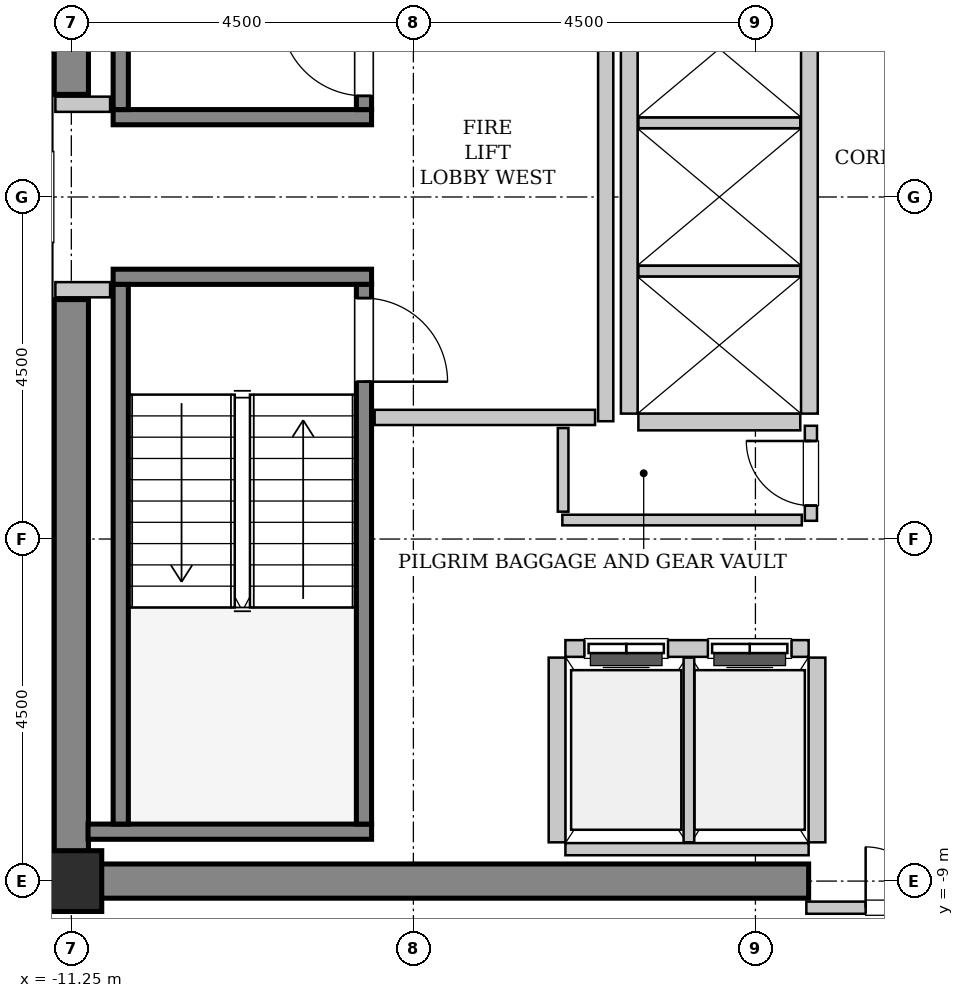
"""IFC4 building model, lengths in metres.
Left out: names, types, materials, properties, quantities, classifications, styles, units other than length and angle.
Written with IfcOpenShell. Run it as: python <this file> out.ifc"""

import sys

from ifc_helpers import new_model, si_unit, direction, frame, frame_2d, origin, origin_2d, place, context, subcontext, project, spatial, rectangle, hollow_rectangle, extrude, source, transform, mapped, element, fill, save


model = new_model("IFC4")
c1 = context("Model", 3, precision=1e-05, world=origin(), true_north=direction((0.0, 1.0)))
c2 = subcontext(c1, "Body", "Model", "MODEL_VIEW")
j1 = project(units=[si_unit("LENGTHUNIT", "METRE"), si_unit("PLANEANGLEUNIT", "RADIAN")], contexts=[c1])
p1 = place(None, origin())
s1 = spatial("IfcSite", under=j1, at=p1, CompositionType="ELEMENT")
p2 = place(p1, origin())
s2 = spatial("IfcBuilding", under=s1, at=p2, CompositionType="ELEMENT")
p3 = place(p2, frame((0.0, 0.0, 256.0)))
s3 = spatial("IfcBuildingStorey", under=s2, at=p3, CompositionType="ELEMENT", Elevation=256.0)
m1 = source(origin(), c2, "Body", "SweptSolid", [
    extrude(rectangle(XDim=9.925, YDim=0.45, at=frame_2d((4.962, 0.0))), origin(), (0.0, 0.0, 1.0), 3.8),
])
p4 = place(p3, frame((-11.475, -9.0, 0.0), z_axis=(0.0, 0.0, 1.0), x_axis=(1.0, 0.0, 0.0)))
e1 = element("IfcWall", 1, at=p4, inside=s3, PredefinedType="SHEAR", context=c2, shape_type="MappedRepresentation", body=[
    mapped(m1, transform((0.0, 0.0, 0.0), x_axis=(1.0, 0.0, 0.0), y_axis=(0.0, 1.0, 0.0), z_axis=(0.0, 0.0, 1.0), scale=1.0)),
])
m2 = source(origin(), c2, "Body", "SweptSolid", [
    extrude(rectangle(XDim=7.425, YDim=0.45, at=frame_2d((3.712, 0.0))), origin(), (0.0, 0.0, 1.0), 3.8),
])
for number, where, z_axis, x_axis in (
    (2, (-11.25, -8.775, 0.0), (0.0, 0.0, 1.0), (0.0, 1.0, 0.0)),
    (3, (-11.25, 1.35, 0.0), (0.0, 0.0, 1.0), (0.0, 1.0, 0.0)),
):
    element("IfcWall", number, at=place(p3, frame(where, z_axis=z_axis, x_axis=x_axis)), inside=s3, PredefinedType="SHEAR", context=c2, shape_type="MappedRepresentation", body=[
        mapped(m2, transform((0.0, 0.0, 0.0), x_axis=(1.0, 0.0, 0.0), y_axis=(0.0, 1.0, 0.0), z_axis=(0.0, 0.0, 1.0), scale=1.0)),
    ])
m3 = source(origin(), c2, "Body", "SweptSolid", [
    extrude(hollow_rectangle(XDim=0.8, YDim=0.8, WallThickness=0.04, InnerFilletRadius=0.04, OuterFilletRadius=0.08, at=origin_2d()), origin(), (0.0, 0.0, 1.0), 3.8),
])
p5 = place(p3, frame((-11.25, -9.0, 0.0), z_axis=(0.0, 0.0, 1.0), x_axis=(1.0, 0.0, 0.0)))
e4 = element("IfcColumn", 4, at=p5, inside=s3, PredefinedType="COLUMN", context=c2, shape_type="MappedRepresentation", body=[
    mapped(m3, transform((0.0, 0.0, 0.0), x_axis=(1.0, 0.0, 0.0), y_axis=(0.0, 1.0, 0.0), z_axis=(0.0, 0.0, 1.0), scale=1.0)),
])
m4 = source(origin(), c2, "Body", "SweptSolid", [
    extrude(rectangle(XDim=3.4, YDim=0.2, at=frame_2d((1.7, 0.0))), origin(), (0.0, 0.0, 1.0), 3.8),
])
p6 = place(p3, frame((-7.3, 1.05, 0.0), z_axis=(0.0, 0.0, 1.0), x_axis=(-1.0, 0.0, 0.0)))
e5 = element("IfcWall", 5, at=p6, inside=s3, PredefinedType="SOLIDWALL", context=c2, shape_type="MappedRepresentation", body=[
    mapped(m4, transform((0.0, 0.0, 0.0), x_axis=(1.0, 0.0, 0.0), y_axis=(0.0, 1.0, 0.0), z_axis=(0.0, 0.0, 1.0), scale=1.0)),
])
m5 = source(origin(), c2, "Body", "SweptSolid", [
    extrude(rectangle(XDim=7.1, YDim=0.2, at=frame_2d((3.55, 0.0))), origin(), (0.0, 0.0, 1.0), 3.8),
])
p7 = place(p3, frame((-7.4, 1.15, 0.0), z_axis=(0.0, 0.0, 1.0), x_axis=(0.0, 1.0, 0.0)))
e6 = element("IfcWall", 6, at=p7, inside=s3, PredefinedType="SOLIDWALL", context=c2, shape_type="MappedRepresentation", body=[
    mapped(m5, transform((0.0, 0.0, 0.0), x_axis=(1.0, 0.0, 0.0), y_axis=(0.0, 1.0, 0.0), z_axis=(0.0, 0.0, 1.0), scale=1.0)),
])
p8 = place(p7, frame((0.18, 0.0, 0.0)))
e7 = element("IfcOpeningElement", 7, at=p8, cuts=e6, PredefinedType="OPENING", context=c2, shape_type="SweptSolid", body=[
    extrude(rectangle(XDim=1.1, YDim=2.15, at=frame_2d((0.55, 1.075))), frame((0.0, 0.11, 0.0), z_axis=(0.0, -1.0, 0.0), x_axis=(1.0, 0.0, 0.0)), (0.0, 0.0, 1.0), 0.22),
])
p9 = place(p3, frame((-10.6, 1.15, 0.0), z_axis=(0.0, 0.0, 1.0), x_axis=(0.0, 1.0, 0.0)))
e8 = element("IfcWall", 8, at=p9, inside=s3, PredefinedType="SOLIDWALL", context=c2, shape_type="MappedRepresentation", body=[
    mapped(m5, transform((0.0, 0.0, 0.0), x_axis=(1.0, 0.0, 0.0), y_axis=(0.0, 1.0, 0.0), z_axis=(0.0, 0.0, 1.0), scale=1.0)),
])
p10 = place(p3, frame((-10.7, -1.05, 0.0), z_axis=(0.0, 0.0, 1.0), x_axis=(1.0, 0.0, 0.0)))
e9 = element("IfcWall", 9, at=p10, inside=s3, PredefinedType="SOLIDWALL", context=c2, shape_type="MappedRepresentation", body=[
    mapped(m4, transform((0.0, 0.0, 0.0), x_axis=(1.0, 0.0, 0.0), y_axis=(0.0, 1.0, 0.0), z_axis=(0.0, 0.0, 1.0), scale=1.0)),
])
m6 = source(origin(), c2, "Body", "SweptSolid", [
    extrude(rectangle(XDim=3.73, YDim=0.2, at=frame_2d((1.865, 0.0))), origin(), (0.0, 0.0, 1.0), 3.8),
])
p11 = place(p3, frame((-11.03, -8.35, 0.0), z_axis=(0.0, 0.0, 1.0), x_axis=(1.0, 0.0, 0.0)))
e10 = element("IfcWall", 10, at=p11, inside=s3, PredefinedType="SOLIDWALL", context=c2, shape_type="MappedRepresentation", body=[
    mapped(m6, transform((0.0, 0.0, 0.0), x_axis=(1.0, 0.0, 0.0), y_axis=(0.0, 1.0, 0.0), z_axis=(0.0, 0.0, 1.0), scale=1.0)),
])
p12 = place(p3, frame((-10.6, -1.15, 0.0), z_axis=(0.0, 0.0, 1.0), x_axis=(0.0, -1.0, 0.0)))
e11 = element("IfcWall", 11, at=p12, inside=s3, PredefinedType="SOLIDWALL", context=c2, shape_type="MappedRepresentation", body=[
    mapped(m5, transform((0.0, 0.0, 0.0), x_axis=(1.0, 0.0, 0.0), y_axis=(0.0, 1.0, 0.0), z_axis=(0.0, 0.0, 1.0), scale=1.0)),
])
p13 = place(p3, frame((-7.4, -1.15, 0.0), z_axis=(0.0, 0.0, 1.0), x_axis=(0.0, -1.0, 0.0)))
e12 = element("IfcWall", 12, at=p13, inside=s3, PredefinedType="SOLIDWALL", context=c2, shape_type="MappedRepresentation", body=[
    mapped(m5, transform((0.0, 0.0, 0.0), x_axis=(1.0, 0.0, 0.0), y_axis=(0.0, 1.0, 0.0), z_axis=(0.0, 0.0, 1.0), scale=1.0)),
])
p14 = place(p13, frame((0.18, 0.0, 0.0)))
e13 = element("IfcOpeningElement", 13, at=p14, cuts=e12, PredefinedType="OPENING", context=c2, shape_type="SweptSolid", body=[
    extrude(rectangle(XDim=1.1, YDim=2.15, at=frame_2d((0.55, 1.075))), frame((0.0, 0.11, 0.0), z_axis=(0.0, -1.0, 0.0), x_axis=(1.0, 0.0, 0.0)), (0.0, 0.0, 1.0), 0.22),
])
m7 = source(origin(), c2, "Body", "SweptSolid", [
    extrude(rectangle(XDim=3.2, YDim=0.22, at=frame_2d((1.6, 0.0))), origin(), (0.0, 0.0, 1.0), 3.485),
])
p15 = place(p3, frame((-1.55, -5.94, 0.0), z_axis=(0.0, 0.0, 1.0), x_axis=(-1.0, 0.0, 0.0)))
e14 = element("IfcWall", 14, at=p15, inside=s3, PredefinedType="SOLIDWALL", context=c2, shape_type="MappedRepresentation", body=[
    mapped(m7, transform((0.0, 0.0, 0.0), x_axis=(1.0, 0.0, 0.0), y_axis=(0.0, 1.0, 0.0), z_axis=(0.0, 0.0, 1.0), scale=1.0)),
])
p16 = place(p15, frame((1.85, 0.0, 0.0)))
e15 = element("IfcOpeningElement", 15, at=p16, cuts=e14, PredefinedType="OPENING", context=c2, shape_type="SweptSolid", body=[
    extrude(rectangle(XDim=1.1, YDim=2.2, at=frame_2d((0.55, 1.1))), frame((0.0, 0.12, 0.0), z_axis=(0.0, -1.0, 0.0), x_axis=(1.0, 0.0, 0.0)), (0.0, 0.0, 1.0), 0.24),
])
p17 = place(p15, frame((0.225, 0.0, 0.0)))
e16 = element("IfcOpeningElement", 16, at=p17, cuts=e14, PredefinedType="OPENING", context=c2, shape_type="SweptSolid", body=[
    extrude(rectangle(XDim=1.1, YDim=2.2, at=frame_2d((0.55, 1.1))), frame((0.0, 0.12, 0.0), z_axis=(0.0, -1.0, 0.0), x_axis=(1.0, 0.0, 0.0)), (0.0, 0.0, 1.0), 0.24),
])
m8 = source(origin(), c2, "Body", "SweptSolid", [
    extrude(rectangle(XDim=3.2, YDim=0.16, at=frame_2d((1.6, 0.0))), origin(), (0.0, 0.0, 1.0), 2.575),
])
p18 = place(p3, frame((-4.75, -8.58, 0.0), z_axis=(0.0, 0.0, 1.0), x_axis=(1.0, 0.0, 0.0)))
e17 = element("IfcWall", 17, at=p18, inside=s3, PredefinedType="PARTITIONING", context=c2, shape_type="MappedRepresentation", body=[
    mapped(m8, transform((0.0, 0.0, 0.0), x_axis=(1.0, 0.0, 0.0), y_axis=(0.0, 1.0, 0.0), z_axis=(0.0, 0.0, 1.0), scale=1.0)),
])
m9 = source(origin(), c2, "Body", "SweptSolid", [
    extrude(rectangle(XDim=2.43, YDim=0.22, at=frame_2d((1.215, 0.0))), origin(), (0.0, 0.0, 1.0), 3.485),
])
p19 = place(p3, frame((-4.86, -6.06, 0.0), z_axis=(0.0, 0.0, 1.0), x_axis=(0.0, -1.0, 0.0)))
e18 = element("IfcWall", 18, at=p19, inside=s3, PredefinedType="SOLIDWALL", context=c2, shape_type="MappedRepresentation", body=[
    mapped(m9, transform((0.0, 0.0, 0.0), x_axis=(1.0, 0.0, 0.0), y_axis=(0.0, 1.0, 0.0), z_axis=(0.0, 0.0, 1.0), scale=1.0)),
])
m10 = source(origin(), c2, "Body", "SweptSolid", [
    extrude(rectangle(XDim=2.43, YDim=0.14, at=frame_2d((1.215, 0.0))), origin(), (0.0, 0.0, 1.0), 3.485),
])
p20 = place(p3, frame((-3.125, -8.49, 0.0), z_axis=(0.0, 0.0, 1.0), x_axis=(0.0, 1.0, 0.0)))
e19 = element("IfcWall", 19, at=p20, inside=s3, PredefinedType="PARTITIONING", context=c2, shape_type="MappedRepresentation", body=[
    mapped(m10, transform((0.0, 0.0, 0.0), x_axis=(1.0, 0.0, 0.0), y_axis=(0.0, 1.0, 0.0), z_axis=(0.0, 0.0, 1.0), scale=1.0)),
])
p21 = place(p3, frame((-1.44, -8.49, 0.0), z_axis=(0.0, 0.0, 1.0), x_axis=(0.0, 1.0, 0.0)))
e20 = element("IfcWall", 20, at=p21, inside=s3, PredefinedType="SOLIDWALL", context=c2, shape_type="MappedRepresentation", body=[
    mapped(m9, transform((0.0, 0.0, 0.0), x_axis=(1.0, 0.0, 0.0), y_axis=(0.0, 1.0, 0.0), z_axis=(0.0, 0.0, 1.0), scale=1.0)),
])
m11 = source(origin(), c2, "Body", "SweptSolid", [
    extrude(rectangle(XDim=5.7, YDim=0.22, at=frame_2d((2.85, 0.0))), origin(), (0.0, 0.0, 1.0), 3.485),
])
for number, where, z_axis, x_axis in (
    (21, (-1.54, -2.85, 0.0), (0.0, 0.0, 1.0), (0.0, 1.0, 0.0)),
    (22, (-3.91, 2.85, 0.0), (0.0, 0.0, 1.0), (0.0, -1.0, 0.0)),
):
    element("IfcWall", number, at=place(p3, frame(where, z_axis=z_axis, x_axis=x_axis)), inside=s3, PredefinedType="SOLIDWALL", context=c2, shape_type="MappedRepresentation", body=[
        mapped(m11, transform((0.0, 0.0, 0.0), x_axis=(1.0, 0.0, 0.0), y_axis=(0.0, 1.0, 0.0), z_axis=(0.0, 0.0, 1.0), scale=1.0)),
    ])
m12 = source(origin(), c2, "Body", "SweptSolid", [
    extrude(rectangle(XDim=2.13, YDim=0.22, at=frame_2d((1.065, 0.0))), origin(), (0.0, 0.0, 1.0), 3.485),
])
p22 = place(p3, frame((-3.79, -2.96, 0.0), z_axis=(0.0, 0.0, 1.0), x_axis=(1.0, 0.0, 0.0)))
e23 = element("IfcWall", 23, at=p22, inside=s3, PredefinedType="SOLIDWALL", context=c2, shape_type="MappedRepresentation", body=[
    mapped(m12, transform((0.0, 0.0, 0.0), x_axis=(1.0, 0.0, 0.0), y_axis=(0.0, 1.0, 0.0), z_axis=(0.0, 0.0, 1.0), scale=1.0)),
])
m13 = source(origin(), c2, "Body", "SweptSolid", [
    extrude(rectangle(XDim=2.13, YDim=0.14, at=frame_2d((1.065, 0.0))), origin(), (0.0, 0.0, 1.0), 3.485),
])
for number, where, z_axis, x_axis in (
    (24, (-3.79, -0.975, 0.0), (0.0, 0.0, 1.0), (1.0, 0.0, 0.0)),
    (25, (-3.79, 0.975, 0.0), (0.0, 0.0, 1.0), (1.0, 0.0, 0.0)),
):
    element("IfcWall", number, at=place(p3, frame(where, z_axis=z_axis, x_axis=x_axis)), inside=s3, PredefinedType="PARTITIONING", context=c2, shape_type="MappedRepresentation", body=[
        mapped(m13, transform((0.0, 0.0, 0.0), x_axis=(1.0, 0.0, 0.0), y_axis=(0.0, 1.0, 0.0), z_axis=(0.0, 0.0, 1.0), scale=1.0)),
    ])
m14 = source(origin(), c2, "Body", "SweptSolid", [
    extrude(rectangle(XDim=5.9, YDim=0.2, at=frame_2d((2.95, 0.0))), origin(), (0.0, 0.0, 1.0), 3.485),
])
p23 = place(p3, frame((-4.22, -2.95, 0.0), z_axis=(0.0, 0.0, 1.0), x_axis=(0.0, 1.0, 0.0)))
e26 = element("IfcWall", 26, at=p23, inside=s3, PredefinedType="PARTITIONING", context=c2, shape_type="MappedRepresentation", body=[
    mapped(m14, transform((0.0, 0.0, 0.0), x_axis=(1.0, 0.0, 0.0), y_axis=(0.0, 1.0, 0.0), z_axis=(0.0, 0.0, 1.0), scale=1.0)),
])
m15 = source(origin(), c2, "Body", "SweptSolid", [
    extrude(rectangle(XDim=2.9, YDim=0.2, at=frame_2d((1.45, 0.0))), origin(), (0.0, 0.0, 1.0), 3.485),
])
p24 = place(p3, frame((-7.26, -2.9, 0.0), z_axis=(0.0, 0.0, 1.0), x_axis=(1.0, 0.0, 0.0)))
e27 = element("IfcWall", 27, at=p24, inside=s3, PredefinedType="PARTITIONING", context=c2, shape_type="MappedRepresentation", body=[
    mapped(m15, transform((0.0, 0.0, 0.0), x_axis=(1.0, 0.0, 0.0), y_axis=(0.0, 1.0, 0.0), z_axis=(0.0, 0.0, 1.0), scale=1.0)),
])
m16 = source(origin(), c2, "Body", "SweptSolid", [
    extrude(rectangle(XDim=0.72, YDim=0.2, at=frame_2d((0.36, 0.0))), origin(), (0.0, 0.0, 1.0), 3.485),
])
for number, where, z_axis, x_axis in (
    (28, (-11.46, 1.22, 0.0), (0.0, 0.0, 1.0), (1.0, 0.0, 0.0)),
    (29, (-11.46, -1.22, 0.0), (0.0, 0.0, 1.0), (1.0, 0.0, 0.0)),
):
    element("IfcWall", number, at=place(p3, frame(where, z_axis=z_axis, x_axis=x_axis)), inside=s3, PredefinedType="PARTITIONING", context=c2, shape_type="MappedRepresentation", body=[
        mapped(m16, transform((0.0, 0.0, 0.0), x_axis=(1.0, 0.0, 0.0), y_axis=(0.0, 1.0, 0.0), z_axis=(0.0, 0.0, 1.0), scale=1.0)),
    ])
m17 = source(origin(), c2, "Body", "SweptSolid", [
    extrude(rectangle(XDim=3.16, YDim=0.16, at=frame_2d((1.58, 0.0))), origin(), (0.0, 0.0, 1.0), 2.575),
])
p25 = place(p3, frame((-1.58, -9.35, 0.0), z_axis=(0.0, 0.0, 1.0), x_axis=(1.0, 0.0, 0.0)))
e30 = element("IfcWall", 30, at=p25, inside=s3, PredefinedType="PARTITIONING", context=c2, shape_type="MappedRepresentation", body=[
    mapped(m17, transform((0.0, 0.0, 0.0), x_axis=(1.0, 0.0, 0.0), y_axis=(0.0, 1.0, 0.0), z_axis=(0.0, 0.0, 1.0), scale=1.0)),
])
p26 = place(p25, frame((0.78, 0.0, 0.0)))
e31 = element("IfcOpeningElement", 31, at=p26, cuts=e30, PredefinedType="OPENING", context=c2, shape_type="SweptSolid", body=[
    extrude(rectangle(XDim=1.6, YDim=2.3, at=frame_2d((0.8, 1.15))), frame((0.0, 0.09, 0.0), z_axis=(0.0, -1.0, 0.0), x_axis=(1.0, 0.0, 0.0)), (0.0, 0.0, 1.0), 0.18),
])
m18 = source(origin(), c2, "Body", "SweptSolid", [
    extrude(rectangle(XDim=1.25, YDim=0.16, at=frame_2d((0.625, 0.0))), origin(), (0.0, 0.0, 1.0), 3.485),
])
p27 = place(p3, frame((-1.52, -4.26, 0.0), z_axis=(0.0, 0.0, 1.0), x_axis=(0.0, 1.0, 0.0)))
e32 = element("IfcWall", 32, at=p27, inside=s3, PredefinedType="PARTITIONING", context=c2, shape_type="MappedRepresentation", body=[
    mapped(m18, transform((0.0, 0.0, 0.0), x_axis=(1.0, 0.0, 0.0), y_axis=(0.0, 1.0, 0.0), z_axis=(0.0, 0.0, 1.0), scale=1.0)),
])
p28 = place(p27, frame((0.2, 0.0, 0.0)))
e33 = element("IfcOpeningElement", 33, at=p28, cuts=e32, PredefinedType="OPENING", context=c2, shape_type="SweptSolid", body=[
    extrude(rectangle(XDim=0.85, YDim=2.1, at=frame_2d((0.425, 1.05))), frame((0.0, 0.09, 0.0), z_axis=(0.0, -1.0, 0.0), x_axis=(1.0, 0.0, 0.0)), (0.0, 0.0, 1.0), 0.18),
])
m19 = source(origin(), c2, "Body", "SweptSolid", [
    extrude(rectangle(XDim=3.15, YDim=0.14, at=frame_2d((1.575, 0.0))), origin(), (0.0, 0.0, 1.0), 3.485),
])
p29 = place(p3, frame((-4.79, -4.25, 0.0), z_axis=(0.0, 0.0, 1.0), x_axis=(1.0, 0.0, 0.0)))
e34 = element("IfcWall", 34, at=p29, inside=s3, PredefinedType="PARTITIONING", context=c2, shape_type="MappedRepresentation", body=[
    mapped(m19, transform((0.0, 0.0, 0.0), x_axis=(1.0, 0.0, 0.0), y_axis=(0.0, 1.0, 0.0), z_axis=(0.0, 0.0, 1.0), scale=1.0)),
])
m20 = source(origin(), c2, "Body", "SweptSolid", [
    extrude(rectangle(XDim=1.1, YDim=0.14, at=frame_2d((0.55, 0.0))), origin(), (0.0, 0.0, 1.0), 3.485),
])
p30 = place(p3, frame((-4.78, -4.14, 0.0), z_axis=(0.0, 0.0, 1.0), x_axis=(0.0, 1.0, 0.0)))
e35 = element("IfcWall", 35, at=p30, inside=s3, PredefinedType="PARTITIONING", context=c2, shape_type="MappedRepresentation", body=[
    mapped(m20, transform((0.0, 0.0, 0.0), x_axis=(1.0, 0.0, 0.0), y_axis=(0.0, 1.0, 0.0), z_axis=(0.0, 0.0, 1.0), scale=1.0)),
])
m21 = source(origin(), c2, "Body", "SweptSolid", [
    extrude(rectangle(XDim=1.1, YDim=2.15, at=frame_2d((0.55, 1.075))), frame((0.0, 0.025, 0.0), z_axis=(0.0, -1.0, 0.0), x_axis=(1.0, 0.0, 0.0)), (0.0, 0.0, 1.0), 0.05),
])
p31 = place(p8, origin())
e36 = element("IfcDoor", 36, at=p31, inside=s3, OperationType="SINGLE_SWING_RIGHT", PredefinedType="DOOR", context=c2, shape_type="MappedRepresentation", body=[
    mapped(m21, transform((0.0, 0.0, 0.0), x_axis=(1.0, 0.0, 0.0), y_axis=(0.0, 1.0, 0.0), z_axis=(0.0, 0.0, 1.0), scale=1.0)),
])
fill(e7, e36)
p32 = place(p14, origin())
e37 = element("IfcDoor", 37, at=p32, inside=s3, OperationType="SINGLE_SWING_RIGHT", PredefinedType="DOOR", context=c2, shape_type="MappedRepresentation", body=[
    mapped(m21, transform((0.0, 0.0, 0.0), x_axis=(1.0, 0.0, 0.0), y_axis=(0.0, 1.0, 0.0), z_axis=(0.0, 0.0, 1.0), scale=1.0)),
])
fill(e13, e37)
m22 = source(origin(), c2, "Body", "SweptSolid", [
    extrude(rectangle(XDim=1.1, YDim=2.2, at=frame_2d((0.55, 1.1))), frame((0.0, 0.025, 0.0), z_axis=(0.0, -1.0, 0.0), x_axis=(1.0, 0.0, 0.0)), (0.0, 0.0, 1.0), 0.05),
])
p33 = place(p16, origin())
e38 = element("IfcDoor", 38, at=p33, inside=s3, OperationType="DOUBLE_DOOR_SLIDING", PredefinedType="DOOR", context=c2, shape_type="MappedRepresentation", body=[
    mapped(m22, transform((0.0, 0.0, 0.0), x_axis=(1.0, 0.0, 0.0), y_axis=(0.0, 1.0, 0.0), z_axis=(0.0, 0.0, 1.0), scale=1.0)),
])
fill(e15, e38)
p34 = place(p17, origin())
e39 = element("IfcDoor", 39, at=p34, inside=s3, OperationType="DOUBLE_DOOR_SLIDING", PredefinedType="DOOR", context=c2, shape_type="MappedRepresentation", body=[
    mapped(m22, transform((0.0, 0.0, 0.0), x_axis=(1.0, 0.0, 0.0), y_axis=(0.0, 1.0, 0.0), z_axis=(0.0, 0.0, 1.0), scale=1.0)),
])
fill(e16, e39)
m23 = source(origin(), c2, "Body", "SweptSolid", [
    extrude(rectangle(XDim=1.6, YDim=2.3, at=frame_2d((0.8, 1.15))), frame((0.0, 0.025, 0.0), z_axis=(0.0, -1.0, 0.0), x_axis=(1.0, 0.0, 0.0)), (0.0, 0.0, 1.0), 0.05),
])
p35 = place(p26, origin())
e40 = element("IfcDoor", 40, at=p35, inside=s3, OperationType="DOUBLE_DOOR_SINGLE_SWING", PredefinedType="DOOR", context=c2, shape_type="MappedRepresentation", body=[
    mapped(m23, transform((0.0, 0.0, 0.0), x_axis=(1.0, 0.0, 0.0), y_axis=(0.0, 1.0, 0.0), z_axis=(0.0, 0.0, 1.0), scale=1.0)),
])
fill(e31, e40)
m24 = source(origin(), c2, "Body", "SweptSolid", [
    extrude(rectangle(XDim=0.85, YDim=2.1, at=frame_2d((0.425, 1.05))), frame((0.0, 0.025, 0.0), z_axis=(0.0, -1.0, 0.0), x_axis=(1.0, 0.0, 0.0)), (0.0, 0.0, 1.0), 0.05),
])
p36 = place(p28, origin())
e41 = element("IfcDoor", 41, at=p36, inside=s3, OperationType="SINGLE_SWING_RIGHT", PredefinedType="DOOR", context=c2, shape_type="MappedRepresentation", body=[
    mapped(m24, transform((0.0, 0.0, 0.0), x_axis=(1.0, 0.0, 0.0), y_axis=(0.0, 1.0, 0.0), z_axis=(0.0, 0.0, 1.0), scale=1.0)),
])
fill(e33, e41)
save(model, sys.argv[1])
